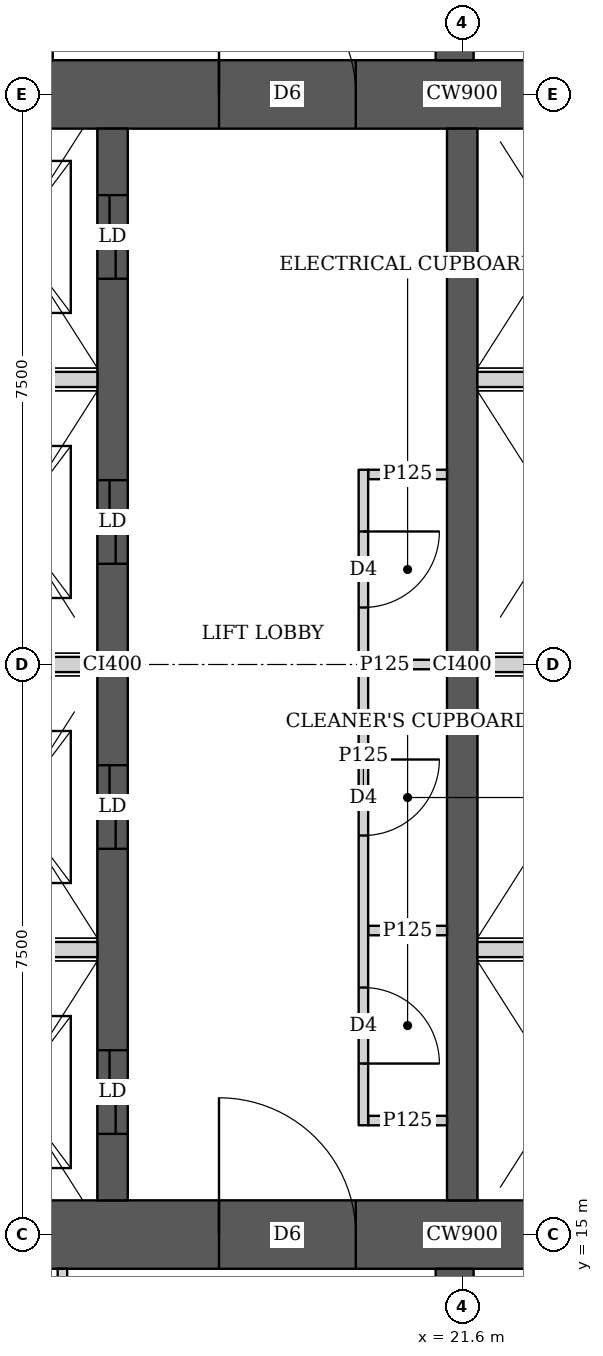
"""IFC4 building model, lengths in metres.
Left out: names, types, materials, properties, quantities, classifications, styles, units other than length and angle.
Written with IfcOpenShell. Run it as: python <this file> out.ifc"""

import sys

from ifc_helpers import new_model, si_unit, direction, frame, frame_2d, origin, place, context, subcontext, project, spatial, rectangle, extrude, element, fill, save


model = new_model("IFC4")
c1 = context("Model", 3, precision=1e-05, world=origin(), true_north=direction((0.0, 1.0)))
c2 = subcontext(c1, "Body", "Model", "MODEL_VIEW")
j1 = project(units=[si_unit("LENGTHUNIT", "METRE"), si_unit("PLANEANGLEUNIT", "RADIAN")], contexts=[c1])
p1 = place(None, origin())
s1 = spatial("IfcSite", under=j1, at=p1, CompositionType="ELEMENT")
p2 = place(p1, origin())
s2 = spatial("IfcBuilding", under=s1, at=p2, CompositionType="ELEMENT")
p3 = place(p2, frame((0.0, 0.0, 122.9)))
s3 = spatial("IfcBuildingStorey", under=s2, at=p3, CompositionType="ELEMENT", Elevation=122.9)
p4 = place(p3, frame((13.95, 15.0, 0.0), z_axis=(0.0, 0.0, 1.0), x_axis=(1.0, 0.0, 0.0)))
e1 = element("IfcWall", 1, at=p4, inside=s3, PredefinedType="SHEAR", context=c2, shape_type="SweptSolid", body=[
    extrude(rectangle(XDim=15.3, YDim=0.9, at=frame_2d((7.65, 0.0))), origin(), (0.0, 0.0, 1.0), 3.75),
])
p5 = place(p4, frame((4.45, 0.0, 0.0)))
e2 = element("IfcOpeningElement", 2, at=p5, cuts=e1, PredefinedType="OPENING", context=c2, shape_type="SweptSolid", body=[
    extrude(rectangle(XDim=1.8, YDim=2.1, at=frame_2d((0.9, 1.05))), frame((0.0, 0.46, 0.0), z_axis=(0.0, -1.0, 0.0), x_axis=(1.0, 0.0, 0.0)), (0.0, 0.0, 1.0), 0.92),
])
p6 = place(p4, frame((10.7, 0.0, 0.0)))
e3 = element("IfcOpeningElement", 3, at=p6, cuts=e1, PredefinedType="OPENING", context=c2, shape_type="SweptSolid", body=[
    extrude(rectangle(XDim=1.1, YDim=2.1, at=frame_2d((0.55, 1.05))), frame((0.0, 0.46, 0.0), z_axis=(0.0, -1.0, 0.0), x_axis=(1.0, 0.0, 0.0)), (0.0, 0.0, 1.0), 0.92),
])
p7 = place(p3, frame((13.95, 30.0, 0.0), z_axis=(0.0, 0.0, 1.0), x_axis=(1.0, 0.0, 0.0)))
e4 = element("IfcWall", 4, at=p7, inside=s3, PredefinedType="SHEAR", context=c2, shape_type="SweptSolid", body=[
    extrude(rectangle(XDim=15.3, YDim=0.9, at=frame_2d((7.65, 0.0))), origin(), (0.0, 0.0, 1.0), 3.75),
])
p8 = place(p7, frame((4.45, 0.0, 0.0)))
e5 = element("IfcOpeningElement", 5, at=p8, cuts=e4, PredefinedType="OPENING", context=c2, shape_type="SweptSolid", body=[
    extrude(rectangle(XDim=1.8, YDim=2.1, at=frame_2d((0.9, 1.05))), frame((0.0, 0.46, 0.0), z_axis=(0.0, -1.0, 0.0), x_axis=(1.0, 0.0, 0.0)), (0.0, 0.0, 1.0), 0.92),
])
p9 = place(p7, frame((10.7, 0.0, 0.0)))
e6 = element("IfcOpeningElement", 6, at=p9, cuts=e4, PredefinedType="OPENING", context=c2, shape_type="SweptSolid", body=[
    extrude(rectangle(XDim=1.1, YDim=2.1, at=frame_2d((0.55, 1.05))), frame((0.0, 0.46, 0.0), z_axis=(0.0, -1.0, 0.0), x_axis=(1.0, 0.0, 0.0)), (0.0, 0.0, 1.0), 0.92),
])
p10 = place(p3, frame((17.0, 15.45, 0.0), z_axis=(0.0, 0.0, 1.0), x_axis=(0.0, 1.0, 0.0)))
e7 = element("IfcWall", 7, at=p10, inside=s3, PredefinedType="SHEAR", context=c2, shape_type="SweptSolid", body=[
    extrude(rectangle(XDim=14.1, YDim=0.4, at=frame_2d((7.05, 0.0))), origin(), (0.0, 0.0, 1.0), 3.75),
])
p11 = place(p10, frame((0.875, 0.0, 0.0)))
e8 = element("IfcOpeningElement", 8, at=p11, cuts=e7, PredefinedType="OPENING", context=c2, shape_type="SweptSolid", body=[
    extrude(rectangle(XDim=1.1, YDim=2.1, at=frame_2d((0.55, 1.05))), frame((0.0, 0.21, 0.0), z_axis=(0.0, -1.0, 0.0), x_axis=(1.0, 0.0, 0.0)), (0.0, 0.0, 1.0), 0.42),
])
p12 = place(p10, frame((4.625, 0.0, 0.0)))
e9 = element("IfcOpeningElement", 9, at=p12, cuts=e7, PredefinedType="OPENING", context=c2, shape_type="SweptSolid", body=[
    extrude(rectangle(XDim=1.1, YDim=2.1, at=frame_2d((0.55, 1.05))), frame((0.0, 0.21, 0.0), z_axis=(0.0, -1.0, 0.0), x_axis=(1.0, 0.0, 0.0)), (0.0, 0.0, 1.0), 0.42),
])
p13 = place(p10, frame((8.375, 0.0, 0.0)))
e10 = element("IfcOpeningElement", 10, at=p13, cuts=e7, PredefinedType="OPENING", context=c2, shape_type="SweptSolid", body=[
    extrude(rectangle(XDim=1.1, YDim=2.1, at=frame_2d((0.55, 1.05))), frame((0.0, 0.21, 0.0), z_axis=(0.0, -1.0, 0.0), x_axis=(1.0, 0.0, 0.0)), (0.0, 0.0, 1.0), 0.42),
])
p14 = place(p10, frame((12.125, 0.0, 0.0)))
e11 = element("IfcOpeningElement", 11, at=p14, cuts=e7, PredefinedType="OPENING", context=c2, shape_type="SweptSolid", body=[
    extrude(rectangle(XDim=1.1, YDim=2.1, at=frame_2d((0.55, 1.05))), frame((0.0, 0.21, 0.0), z_axis=(0.0, -1.0, 0.0), x_axis=(1.0, 0.0, 0.0)), (0.0, 0.0, 1.0), 0.42),
])
p15 = place(p3, frame((21.6, 15.45, 0.0), z_axis=(0.0, 0.0, 1.0), x_axis=(0.0, 1.0, 0.0)))
e12 = element("IfcWall", 12, at=p15, inside=s3, PredefinedType="SHEAR", context=c2, shape_type="SweptSolid", body=[
    extrude(rectangle(XDim=14.1, YDim=0.4, at=frame_2d((7.05, 0.0))), origin(), (0.0, 0.0, 1.0), 3.75),
])
for number, where, z_axis, x_axis in (
    (13, (21.5, 10.35, 0.0), (0.0, 0.0, 1.0), (0.0, 1.0, 0.0)),
    (14, (21.5, 30.45, 0.0), (0.0, 0.0, 1.0), (0.0, 1.0, 0.0)),
):
    element("IfcWall", number, at=place(p3, frame(where, z_axis=z_axis, x_axis=x_axis)), inside=s3, PredefinedType="SHEAR", context=c2, shape_type="SweptSolid", body=[
        extrude(rectangle(XDim=4.2, YDim=0.5, at=frame_2d((2.1, 0.0))), origin(), (0.0, 0.0, 1.0), 3.75),
    ])
p16 = place(p3, frame((16.34, 10.163, 0.0), z_axis=(0.0, 0.0, 1.0), x_axis=(0.0, 1.0, 0.0)))
e15 = element("IfcWall", 15, at=p16, inside=s3, PredefinedType="PARTITIONING", context=c2, shape_type="SweptSolid", body=[
    extrude(rectangle(XDim=4.387, YDim=0.125, at=frame_2d((2.193, 0.0))), origin(), (0.0, 0.0, 1.0), 3.5),
])
p17 = place(p16, frame((1.637, 0.0, 0.0)))
e16 = element("IfcOpeningElement", 16, at=p17, cuts=e15, PredefinedType="OPENING", context=c2, shape_type="SweptSolid", body=[
    extrude(rectangle(XDim=1.0, YDim=2.1, at=frame_2d((0.5, 1.05))), frame((0.0, 0.073, 0.0), z_axis=(0.0, -1.0, 0.0), x_axis=(1.0, 0.0, 0.0)), (0.0, 0.0, 1.0), 0.145),
])
p18 = place(p3, frame((16.15, 30.45, 0.0), z_axis=(0.0, 0.0, 1.0), x_axis=(0.0, 1.0, 0.0)))
e17 = element("IfcWall", 17, at=p18, inside=s3, PredefinedType="PARTITIONING", context=c2, shape_type="SweptSolid", body=[
    extrude(rectangle(XDim=4.387, YDim=0.125, at=frame_2d((2.193, 0.0))), origin(), (0.0, 0.0, 1.0), 3.5),
])
p19 = place(p18, frame((1.75, 0.0, 0.0)))
e18 = element("IfcOpeningElement", 18, at=p19, cuts=e17, PredefinedType="OPENING", context=c2, shape_type="SweptSolid", body=[
    extrude(rectangle(XDim=1.0, YDim=2.1, at=frame_2d((0.5, 1.05))), frame((0.0, 0.073, 0.0), z_axis=(0.0, -1.0, 0.0), x_axis=(1.0, 0.0, 0.0)), (0.0, 0.0, 1.0), 0.145),
])
p20 = place(p3, frame((20.3, 16.438, 0.0), z_axis=(0.0, 0.0, 1.0), x_axis=(0.0, 1.0, 0.0)))
e19 = element("IfcWall", 19, at=p20, inside=s3, PredefinedType="PARTITIONING", context=c2, shape_type="SweptSolid", body=[
    extrude(rectangle(XDim=8.624, YDim=0.125, at=frame_2d((4.312, 0.0))), origin(), (0.0, 0.0, 1.0), 3.5),
])
p21 = place(p20, frame((0.812, 0.0, 0.0)))
e20 = element("IfcOpeningElement", 20, at=p21, cuts=e19, PredefinedType="OPENING", context=c2, shape_type="SweptSolid", body=[
    extrude(rectangle(XDim=1.0, YDim=2.1, at=frame_2d((0.5, 1.05))), frame((0.0, 0.073, 0.0), z_axis=(0.0, -1.0, 0.0), x_axis=(1.0, 0.0, 0.0)), (0.0, 0.0, 1.0), 0.145),
])
p22 = place(p20, frame((3.812, 0.0, 0.0)))
e21 = element("IfcOpeningElement", 21, at=p22, cuts=e19, PredefinedType="OPENING", context=c2, shape_type="SweptSolid", body=[
    extrude(rectangle(XDim=1.0, YDim=2.1, at=frame_2d((0.5, 1.05))), frame((0.0, 0.073, 0.0), z_axis=(0.0, -1.0, 0.0), x_axis=(1.0, 0.0, 0.0)), (0.0, 0.0, 1.0), 0.145),
])
p23 = place(p20, frame((6.812, 0.0, 0.0)))
e22 = element("IfcOpeningElement", 22, at=p23, cuts=e19, PredefinedType="OPENING", context=c2, shape_type="SweptSolid", body=[
    extrude(rectangle(XDim=1.0, YDim=2.1, at=frame_2d((0.5, 1.05))), frame((0.0, 0.073, 0.0), z_axis=(0.0, -1.0, 0.0), x_axis=(1.0, 0.0, 0.0)), (0.0, 0.0, 1.0), 0.145),
])
for number, where, z_axis, x_axis in (
    (23, (20.363, 16.5, 0.0), (0.0, 0.0, 1.0), (1.0, 0.0, 0.0)),
    (24, (20.363, 25.0, 0.0), (0.0, 0.0, 1.0), (1.0, 0.0, 0.0)),
    (25, (20.363, 19.0, 0.0), (0.0, 0.0, 1.0), (1.0, 0.0, 0.0)),
    (26, (20.363, 22.5, 0.0), (0.0, 0.0, 1.0), (1.0, 0.0, 0.0)),
):
    element("IfcWall", number, at=place(p3, frame(where, z_axis=z_axis, x_axis=x_axis)), inside=s3, PredefinedType="PARTITIONING", context=c2, shape_type="SweptSolid", body=[
        extrude(rectangle(XDim=1.037, YDim=0.125, at=frame_2d((0.519, 0.0))), origin(), (0.0, 0.0, 1.0), 3.5),
    ])
p24 = place(p3, frame((14.85, 18.75, 0.0), z_axis=(0.0, 0.0, 1.0), x_axis=(1.0, 0.0, 0.0)))
e27 = element("IfcWall", 27, at=p24, inside=s3, PredefinedType="SOLIDWALL", context=c2, shape_type="SweptSolid", body=[
    extrude(rectangle(XDim=1.95, YDim=0.2, at=frame_2d((0.975, 0.0))), origin(), (0.0, 0.0, 1.0), 3.5),
])
p25 = place(p3, frame((21.8, 18.75, 0.0), z_axis=(0.0, 0.0, 1.0), x_axis=(1.0, 0.0, 0.0)))
e28 = element("IfcWall", 28, at=p25, inside=s3, PredefinedType="SOLIDWALL", context=c2, shape_type="SweptSolid", body=[
    extrude(rectangle(XDim=2.2, YDim=0.2, at=frame_2d((1.1, 0.0))), origin(), (0.0, 0.0, 1.0), 3.5),
])
p26 = place(p3, frame((14.85, 22.5, 0.0), z_axis=(0.0, 0.0, 1.0), x_axis=(1.0, 0.0, 0.0)))
e29 = element("IfcWall", 29, at=p26, inside=s3, PredefinedType="SOLIDWALL", context=c2, shape_type="SweptSolid", body=[
    extrude(rectangle(XDim=1.95, YDim=0.2, at=frame_2d((0.975, 0.0))), origin(), (0.0, 0.0, 1.0), 3.5),
])
p27 = place(p3, frame((21.8, 22.5, 0.0), z_axis=(0.0, 0.0, 1.0), x_axis=(1.0, 0.0, 0.0)))
e30 = element("IfcWall", 30, at=p27, inside=s3, PredefinedType="SOLIDWALL", context=c2, shape_type="SweptSolid", body=[
    extrude(rectangle(XDim=2.2, YDim=0.2, at=frame_2d((1.1, 0.0))), origin(), (0.0, 0.0, 1.0), 3.5),
])
p28 = place(p3, frame((14.85, 26.25, 0.0), z_axis=(0.0, 0.0, 1.0), x_axis=(1.0, 0.0, 0.0)))
e31 = element("IfcWall", 31, at=p28, inside=s3, PredefinedType="SOLIDWALL", context=c2, shape_type="SweptSolid", body=[
    extrude(rectangle(XDim=1.95, YDim=0.2, at=frame_2d((0.975, 0.0))), origin(), (0.0, 0.0, 1.0), 3.5),
])
p29 = place(p3, frame((21.8, 26.25, 0.0), z_axis=(0.0, 0.0, 1.0), x_axis=(1.0, 0.0, 0.0)))
e32 = element("IfcWall", 32, at=p29, inside=s3, PredefinedType="SOLIDWALL", context=c2, shape_type="SweptSolid", body=[
    extrude(rectangle(XDim=2.2, YDim=0.2, at=frame_2d((1.1, 0.0))), origin(), (0.0, 0.0, 1.0), 3.5),
])
p30 = place(p21, origin())
e33 = element("IfcDoor", 33, at=p30, inside=s3, OperationType="SINGLE_SWING_RIGHT", PredefinedType="DOOR", context=c2, shape_type="SweptSolid", body=[
    extrude(rectangle(XDim=1.0, YDim=2.1, at=frame_2d((0.5, 1.05))), frame((0.0, 0.025, 0.0), z_axis=(0.0, -1.0, 0.0), x_axis=(1.0, 0.0, 0.0)), (0.0, 0.0, 1.0), 0.05),
])
fill(e20, e33)
p31 = place(p22, origin())
e34 = element("IfcDoor", 34, at=p31, inside=s3, OperationType="SINGLE_SWING_LEFT", PredefinedType="DOOR", context=c2, shape_type="SweptSolid", body=[
    extrude(rectangle(XDim=1.0, YDim=2.1, at=frame_2d((0.5, 1.05))), frame((0.0, 0.025, 0.0), z_axis=(0.0, -1.0, 0.0), x_axis=(1.0, 0.0, 0.0)), (0.0, 0.0, 1.0), 0.05),
])
fill(e21, e34)
p32 = place(p23, origin())
e35 = element("IfcDoor", 35, at=p32, inside=s3, OperationType="SINGLE_SWING_LEFT", PredefinedType="DOOR", context=c2, shape_type="SweptSolid", body=[
    extrude(rectangle(XDim=1.0, YDim=2.1, at=frame_2d((0.5, 1.05))), frame((0.0, 0.025, 0.0), z_axis=(0.0, -1.0, 0.0), x_axis=(1.0, 0.0, 0.0)), (0.0, 0.0, 1.0), 0.05),
])
fill(e22, e35)
p33 = place(p5, origin())
e36 = element("IfcDoor", 36, at=p33, inside=s3, OperationType="DOUBLE_DOOR_SINGLE_SWING", PredefinedType="DOOR", context=c2, shape_type="SweptSolid", body=[
    extrude(rectangle(XDim=1.8, YDim=2.1, at=frame_2d((0.9, 1.05))), frame((0.0, 0.025, 0.0), z_axis=(0.0, -1.0, 0.0), x_axis=(1.0, 0.0, 0.0)), (0.0, 0.0, 1.0), 0.05),
])
fill(e2, e36)
p34 = place(p8, origin())
e37 = element("IfcDoor", 37, at=p34, inside=s3, OperationType="DOUBLE_DOOR_SINGLE_SWING", PredefinedType="DOOR", context=c2, shape_type="SweptSolid", body=[
    extrude(rectangle(XDim=1.8, YDim=2.1, at=frame_2d((0.9, 1.05))), frame((0.0, 0.025, 0.0), z_axis=(0.0, -1.0, 0.0), x_axis=(1.0, 0.0, 0.0)), (0.0, 0.0, 1.0), 0.05),
])
fill(e5, e37)
p35 = place(p11, origin())
e38 = element("IfcDoor", 38, at=p35, inside=s3, OperationType="DOUBLE_DOOR_SLIDING", PredefinedType="DOOR", context=c2, shape_type="SweptSolid", body=[
    extrude(rectangle(XDim=1.1, YDim=2.1, at=frame_2d((0.55, 1.05))), frame((0.0, 0.025, 0.0), z_axis=(0.0, -1.0, 0.0), x_axis=(1.0, 0.0, 0.0)), (0.0, 0.0, 1.0), 0.05),
])
fill(e8, e38)
p36 = place(p12, origin())
e39 = element("IfcDoor", 39, at=p36, inside=s3, OperationType="DOUBLE_DOOR_SLIDING", PredefinedType="DOOR", context=c2, shape_type="SweptSolid", body=[
    extrude(rectangle(XDim=1.1, YDim=2.1, at=frame_2d((0.55, 1.05))), frame((0.0, 0.025, 0.0), z_axis=(0.0, -1.0, 0.0), x_axis=(1.0, 0.0, 0.0)), (0.0, 0.0, 1.0), 0.05),
])
fill(e9, e39)
p37 = place(p13, origin())
e40 = element("IfcDoor", 40, at=p37, inside=s3, OperationType="DOUBLE_DOOR_SLIDING", PredefinedType="DOOR", context=c2, shape_type="SweptSolid", body=[
    extrude(rectangle(XDim=1.1, YDim=2.1, at=frame_2d((0.55, 1.05))), frame((0.0, 0.025, 0.0), z_axis=(0.0, -1.0, 0.0), x_axis=(1.0, 0.0, 0.0)), (0.0, 0.0, 1.0), 0.05),
])
fill(e10, e40)
p38 = place(p14, origin())
e41 = element("IfcDoor", 41, at=p38, inside=s3, OperationType="DOUBLE_DOOR_SLIDING", PredefinedType="DOOR", context=c2, shape_type="SweptSolid", body=[
    extrude(rectangle(XDim=1.1, YDim=2.1, at=frame_2d((0.55, 1.05))), frame((0.0, 0.025, 0.0), z_axis=(0.0, -1.0, 0.0), x_axis=(1.0, 0.0, 0.0)), (0.0, 0.0, 1.0), 0.05),
])
fill(e11, e41)
save(model, sys.argv[1])
